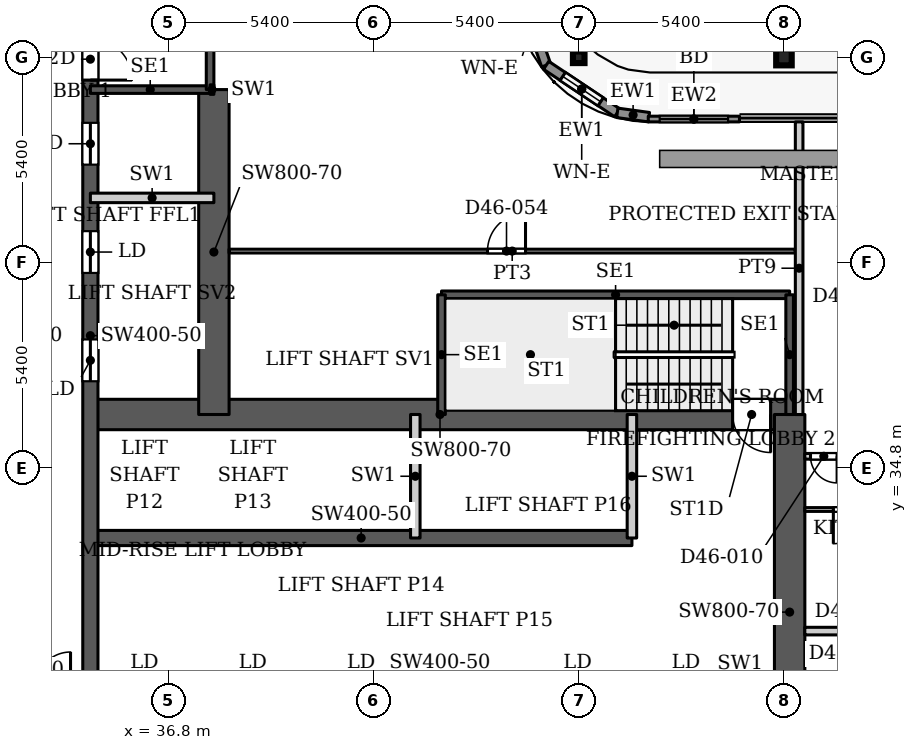
"""IFC4 building model, lengths in metres.
Left out: names, types, materials, properties, quantities, classifications, styles, units other than length and angle.
Written with IfcOpenShell. Run it as: python <this file> out.ifc"""

import sys

from ifc_helpers import new_model, si_unit, direction, frame, frame_2d, origin, origin_2d, place, context, subcontext, project, spatial, rectangle, hollow_rectangle, i_section, extrude, source, transform, mapped, element, fill, save


model = new_model("IFC4")
c1 = context("Model", 3, precision=1e-05, world=origin(), true_north=direction((0.0, 1.0)))
c2 = subcontext(c1, "Body", "Model", "MODEL_VIEW")
j1 = project(units=[si_unit("LENGTHUNIT", "METRE"), si_unit("PLANEANGLEUNIT", "RADIAN")], contexts=[c1])
p1 = place(None, origin())
s1 = spatial("IfcSite", under=j1, at=p1, CompositionType="ELEMENT")
p2 = place(p1, origin())
s2 = spatial("IfcBuilding", under=s1, at=p2, CompositionType="ELEMENT")
p3 = place(p2, frame((0.0, 0.0, 199.4)))
s3 = spatial("IfcBuildingStorey", under=s2, at=p3, CompositionType="ELEMENT", Elevation=199.4)
p4 = place(p3, frame((53.0, 45.6, 0.0), z_axis=(0.0, 0.0, 1.0), x_axis=(1.0, 0.0, 0.0)))
e1 = element("IfcColumn", 1, at=p4, inside=s3, PredefinedType="COLUMN", context=c2, shape_type="SweptSolid", body=[
    extrude(i_section(OverallWidth=0.409, OverallDepth=0.425, WebThickness=0.033, FlangeThickness=0.052, FilletRadius=0.013, at=origin_2d()), origin(), (0.0, 0.0, 1.0), 3.9),
])
p5 = place(p3, frame((47.6, 45.6, 0.0), z_axis=(0.0, 0.0, 1.0), x_axis=(1.0, 0.0, 0.0)))
e2 = element("IfcColumn", 2, at=p5, inside=s3, PredefinedType="COLUMN", context=c2, shape_type="SweptSolid", body=[
    extrude(hollow_rectangle(XDim=0.305, YDim=0.305, WallThickness=0.016, InnerFilletRadius=0.016, OuterFilletRadius=0.032, at=origin_2d()), origin(), (0.0, 0.0, 1.0), 3.9),
])
p6 = place(p3, frame((34.75, 32.95, 0.0), z_axis=(0.0, 0.0, 1.0), x_axis=(1.0, 0.0, 0.0)))
e3 = element("IfcWall", 3, at=p6, inside=s3, PredefinedType="SHEAR", context=c2, shape_type="SweptSolid", body=[
    extrude(rectangle(XDim=14.25, YDim=0.4, at=frame_2d((7.125, 0.0))), origin(), (0.0, 0.0, 1.0), 3.9),
])
p7 = place(p3, frame((34.75, 36.2, 0.0), z_axis=(0.0, 0.0, 1.0), x_axis=(1.0, 0.0, 0.0)))
e4 = element("IfcWall", 4, at=p7, inside=s3, PredefinedType="SHEAR", context=c2, shape_type="SweptSolid", body=[
    extrude(rectangle(XDim=18.4, YDim=0.8, at=frame_2d((9.2, 0.0))), origin(), (0.0, 0.0, 1.0), 3.9),
])
p8 = place(p7, frame((16.9, 0.0, 0.0)))
e5 = element("IfcOpeningElement", 5, at=p8, cuts=e4, PredefinedType="OPENING", context=c2, shape_type="SweptSolid", body=[
    extrude(rectangle(XDim=1.0, YDim=2.2, at=frame_2d((0.5, 1.1))), frame((0.0, 0.41, 0.0), z_axis=(0.0, -1.0, 0.0), x_axis=(1.0, 0.0, 0.0)), (0.0, 0.0, 1.0), 0.82),
])
p9 = place(p3, frame((34.75, 29.05, 0.0), z_axis=(0.0, 0.0, 1.0), x_axis=(0.0, 1.0, 0.0)))
e6 = element("IfcWall", 6, at=p9, inside=s3, PredefinedType="SHEAR", context=c2, shape_type="SweptSolid", body=[
    extrude(rectangle(XDim=18.45, YDim=0.4, at=frame_2d((9.225, 0.0))), origin(), (0.0, 0.0, 1.0), 3.9),
])
p10 = place(p9, frame((8.025, 0.0, 0.0)))
e7 = element("IfcOpeningElement", 7, at=p10, cuts=e6, PredefinedType="OPENING", context=c2, shape_type="SweptSolid", body=[
    extrude(rectangle(XDim=1.1, YDim=2.2, at=frame_2d((0.55, 1.1))), frame((0.0, 0.21, 0.0), z_axis=(0.0, -1.0, 0.0), x_axis=(1.0, 0.0, 0.0)), (0.0, 0.0, 1.0), 0.42),
])
p11 = place(p9, frame((10.875, 0.0, 0.0)))
e8 = element("IfcOpeningElement", 8, at=p11, cuts=e6, PredefinedType="OPENING", context=c2, shape_type="SweptSolid", body=[
    extrude(rectangle(XDim=1.1, YDim=2.2, at=frame_2d((0.55, 1.1))), frame((0.0, 0.21, 0.0), z_axis=(0.0, -1.0, 0.0), x_axis=(1.0, 0.0, 0.0)), (0.0, 0.0, 1.0), 0.42),
])
p12 = place(p9, frame((13.725, 0.0, 0.0)))
e9 = element("IfcOpeningElement", 9, at=p12, cuts=e6, PredefinedType="OPENING", context=c2, shape_type="SweptSolid", body=[
    extrude(rectangle(XDim=1.1, YDim=2.2, at=frame_2d((0.55, 1.1))), frame((0.0, 0.21, 0.0), z_axis=(0.0, -1.0, 0.0), x_axis=(1.0, 0.0, 0.0)), (0.0, 0.0, 1.0), 0.42),
])
p13 = place(p9, frame((15.95, 0.0, 0.0)))
e10 = element("IfcOpeningElement", 10, at=p13, cuts=e6, PredefinedType="OPENING", context=c2, shape_type="SweptSolid", body=[
    extrude(rectangle(XDim=1.1, YDim=2.2, at=frame_2d((0.55, 1.1))), frame((0.0, 0.21, 0.0), z_axis=(0.0, -1.0, 0.0), x_axis=(1.0, 0.0, 0.0)), (0.0, 0.0, 1.0), 0.42),
])
p14 = place(p3, frame((38.0, 36.2, 0.0), z_axis=(0.0, 0.0, 1.0), x_axis=(0.0, 1.0, 0.0)))
e11 = element("IfcWall", 11, at=p14, inside=s3, PredefinedType="SHEAR", context=c2, shape_type="SweptSolid", body=[
    extrude(rectangle(XDim=8.55, YDim=0.8, at=frame_2d((4.275, 0.0))), origin(), (0.0, 0.0, 1.0), 3.9),
])
p15 = place(p3, frame((53.15, 25.8, 0.0), z_axis=(0.0, 0.0, 1.0), x_axis=(0.0, 1.0, 0.0)))
e12 = element("IfcWall", 12, at=p15, inside=s3, PredefinedType="SHEAR", context=c2, shape_type="SweptSolid", body=[
    extrude(rectangle(XDim=10.4, YDim=0.8, at=frame_2d((5.2, 0.0))), origin(), (0.0, 0.0, 1.0), 3.9),
])
p16 = place(p3, frame((46.018, 47.471, 0.0), z_axis=(0.0, 0.0, 1.0), x_axis=(0.328791208903, -0.944402637093, 0.0)))
e13 = element("IfcWall", 13, at=p16, inside=s3, PredefinedType="SOLIDWALL", context=c2, shape_type="SweptSolid", body=[
    extrude(rectangle(XDim=2.205, YDim=0.25, at=frame_2d((1.102, 0.0))), origin(), (0.0, 0.0, 1.0), 3.75),
])
p17 = place(p16, frame((0.503, 0.0, 0.6)))
e14 = element("IfcOpeningElement", 14, at=p17, cuts=e13, PredefinedType="OPENING", context=c2, shape_type="SweptSolid", body=[
    extrude(rectangle(XDim=1.2, YDim=2.1, at=frame_2d((0.6, 1.05))), frame((0.0, 0.135, 0.0), z_axis=(0.0, -1.0, 0.0), x_axis=(1.0, 0.0, 0.0)), (0.0, 0.0, 1.0), 0.27),
])
p18 = place(p3, frame((46.743, 45.389, 0.0), z_axis=(0.0, 0.0, 1.0), x_axis=(0.831449265529, -0.555600682912, 0.0)))
e15 = element("IfcWall", 15, at=p18, inside=s3, PredefinedType="SOLIDWALL", context=c2, shape_type="SweptSolid", body=[
    extrude(rectangle(XDim=2.251, YDim=0.25, at=frame_2d((1.126, 0.0))), origin(), (0.0, 0.0, 1.0), 3.75),
])
p19 = place(p18, frame((0.525, 0.0, 0.6)))
e16 = element("IfcOpeningElement", 16, at=p19, cuts=e15, PredefinedType="OPENING", context=c2, shape_type="SweptSolid", body=[
    extrude(rectangle(XDim=1.2, YDim=2.1, at=frame_2d((0.6, 1.05))), frame((0.0, 0.135, 0.0), z_axis=(0.0, -1.0, 0.0), x_axis=(1.0, 0.0, 0.0)), (0.0, 0.0, 1.0), 0.27),
])
p20 = place(p3, frame((48.615, 44.138, 0.0), z_axis=(0.0, 0.0, 1.0), x_axis=(0.990741504246, -0.135761819977, 0.0)))
e17 = element("IfcWall", 17, at=p20, inside=s3, PredefinedType="SOLIDWALL", context=c2, shape_type="SweptSolid", body=[
    extrude(rectangle(XDim=0.84, YDim=0.25, at=frame_2d((0.42, 0.0))), origin(), (0.0, 0.0, 1.0), 3.75),
])
p21 = place(p3, frame((49.43, 43.975, 0.0), z_axis=(0.0, 0.0, 1.0), x_axis=(1.0, 0.0, 0.0)))
e18 = element("IfcWall", 18, at=p21, inside=s3, PredefinedType="SOLIDWALL", context=c2, shape_type="SweptSolid", body=[
    extrude(rectangle(XDim=2.4, YDim=0.15, at=frame_2d((1.2, 0.0))), origin(), (0.0, 0.0, 1.0), 3.75),
])
p22 = place(p21, frame((0.3, 0.0, 0.0)))
e19 = element("IfcOpeningElement", 19, at=p22, cuts=e18, PredefinedType="OPENING", context=c2, shape_type="SweptSolid", body=[
    extrude(rectangle(XDim=1.8, YDim=2.4, at=frame_2d((0.9, 1.2))), frame((0.0, 0.085, 0.0), z_axis=(0.0, -1.0, 0.0), x_axis=(1.0, 0.0, 0.0)), (0.0, 0.0, 1.0), 0.17),
])
p23 = place(p3, frame((43.99, 39.35, 0.0), z_axis=(0.0, 0.0, 1.0), x_axis=(1.0, 0.0, 0.0)))
e20 = element("IfcWall", 20, at=p23, inside=s3, PredefinedType="SHEAR", context=c2, shape_type="SweptSolid", body=[
    extrude(rectangle(XDim=9.16, YDim=0.2, at=frame_2d((4.58, 0.0))), origin(), (0.0, 0.0, 1.0), 3.9),
])
for number, where, z_axis, x_axis in (
    (21, (43.99, 36.2, 0.0), (0.0, 0.0, 1.0), (0.0, 1.0, 0.0)),
    (22, (53.15, 36.2, 0.0), (0.0, 0.0, 1.0), (0.0, 1.0, 0.0)),
):
    element("IfcWall", number, at=place(p3, frame(where, z_axis=z_axis, x_axis=x_axis)), inside=s3, PredefinedType="SHEAR", context=c2, shape_type="SweptSolid", body=[
        extrude(rectangle(XDim=3.15, YDim=0.2, at=frame_2d((1.575, 0.0))), origin(), (0.0, 0.0, 1.0), 3.9),
    ])
p24 = place(p3, frame((34.75, 44.75, 0.0), z_axis=(0.0, 0.0, 1.0), x_axis=(1.0, 0.0, 0.0)))
e23 = element("IfcWall", 23, at=p24, inside=s3, PredefinedType="SHEAR", context=c2, shape_type="SweptSolid", body=[
    extrude(rectangle(XDim=3.15, YDim=0.2, at=frame_2d((1.575, 0.0))), origin(), (0.0, 0.0, 1.0), 3.9),
])
p25 = place(p3, frame((37.9, 44.75, 0.0), z_axis=(0.0, 0.0, 1.0), x_axis=(0.0, 1.0, 0.0)))
e24 = element("IfcWall", 24, at=p25, inside=s3, PredefinedType="SHEAR", context=c2, shape_type="SweptSolid", body=[
    extrude(rectangle(XDim=9.16, YDim=0.2, at=frame_2d((4.58, 0.0))), origin(), (0.0, 0.0, 1.0), 3.9),
])
for number, where, z_axis, x_axis in (
    (25, (43.3, 32.95, 0.0), (0.0, 0.0, 1.0), (0.0, 1.0, 0.0)),
    (26, (49.0, 32.95, 0.0), (0.0, 0.0, 1.0), (0.0, 1.0, 0.0)),
    (27, (34.75, 41.9, 0.0), (0.0, 0.0, 1.0), (1.0, 0.0, 0.0)),
):
    element("IfcWall", number, at=place(p3, frame(where, z_axis=z_axis, x_axis=x_axis)), inside=s3, PredefinedType="PARTITIONING", context=c2, shape_type="SweptSolid", body=[
        extrude(rectangle(XDim=3.25, YDim=0.25, at=frame_2d((1.625, 0.0))), origin(), (0.0, 0.0, 1.0), 3.9),
    ])
p26 = place(p3, frame((37.9, 44.75, 0.0), z_axis=(0.0, 0.0, 1.0), x_axis=(1.0, 0.0, 0.0)))
e28 = element("IfcWall", 28, at=p26, inside=s3, PredefinedType="PARTITIONING", context=c2, shape_type="SweptSolid", body=[
    extrude(rectangle(XDim=0.1, YDim=0.25, at=frame_2d((0.05, 0.0))), origin(), (0.0, 0.0, 1.0), 3.9),
])
p27 = place(p3, frame((38.399, 40.5, 0.0), z_axis=(0.0, 0.0, 1.0), x_axis=(1.0, 0.0, 0.0)))
e29 = element("IfcWall", 29, at=p27, inside=s3, PredefinedType="PARTITIONING", context=c2, shape_type="SweptSolid", body=[
    extrude(rectangle(XDim=14.901, YDim=0.1, at=frame_2d((7.451, 0.0))), origin(), (0.0, 0.0, 1.0), 3.6),
])
p28 = place(p27, frame((6.801, 0.0, 0.0)))
e30 = element("IfcOpeningElement", 30, at=p28, cuts=e29, PredefinedType="OPENING", context=c2, shape_type="SweptSolid", body=[
    extrude(rectangle(XDim=1.0, YDim=2.1, at=frame_2d((0.5, 1.05))), frame((0.0, 0.06, 0.0), z_axis=(0.0, -1.0, 0.0), x_axis=(1.0, 0.0, 0.0)), (0.0, 0.0, 1.0), 0.12),
])
p29 = place(p3, frame((53.4, 36.199, 0.0), z_axis=(0.0, 0.0, 1.0), x_axis=(0.0, 1.0, 0.0)))
e31 = element("IfcWall", 31, at=p29, inside=s3, PredefinedType="PARTITIONING", context=c2, shape_type="SweptSolid", body=[
    extrude(rectangle(XDim=7.701, YDim=0.2, at=frame_2d((3.851, 0.0))), origin(), (0.0, 0.0, 1.0), 3.6),
])
p30 = place(p3, frame((53.549, 30.5, 0.0), z_axis=(0.0, 0.0, 1.0), x_axis=(1.0, 0.0, 0.0)))
e32 = element("IfcWall", 32, at=p30, inside=s3, PredefinedType="PARTITIONING", context=c2, shape_type="SweptSolid", body=[
    extrude(rectangle(XDim=44.551, YDim=0.2, at=frame_2d((22.275, 0.0))), origin(), (0.0, 0.0, 1.0), 3.6),
])
p31 = place(p30, frame((5.501, 0.0, 0.0)))
e33 = element("IfcOpeningElement", 33, at=p31, cuts=e32, PredefinedType="OPENING", context=c2, shape_type="SweptSolid", body=[
    extrude(rectangle(XDim=1.0, YDim=2.1, at=frame_2d((0.5, 1.05))), frame((0.0, 0.11, 0.0), z_axis=(0.0, -1.0, 0.0), x_axis=(1.0, 0.0, 0.0)), (0.0, 0.0, 1.0), 0.22),
])
p32 = place(p30, frame((20.201, 0.0, 0.0)))
e34 = element("IfcOpeningElement", 34, at=p32, cuts=e32, PredefinedType="OPENING", context=c2, shape_type="SweptSolid", body=[
    extrude(rectangle(XDim=1.0, YDim=2.1, at=frame_2d((0.5, 1.05))), frame((0.0, 0.11, 0.0), z_axis=(0.0, -1.0, 0.0), x_axis=(1.0, 0.0, 0.0)), (0.0, 0.0, 1.0), 0.22),
])
p33 = place(p30, frame((24.251, 0.0, 0.0)))
e35 = element("IfcOpeningElement", 35, at=p33, cuts=e32, PredefinedType="OPENING", context=c2, shape_type="SweptSolid", body=[
    extrude(rectangle(XDim=1.0, YDim=2.1, at=frame_2d((0.5, 1.05))), frame((0.0, 0.11, 0.0), z_axis=(0.0, -1.0, 0.0), x_axis=(1.0, 0.0, 0.0)), (0.0, 0.0, 1.0), 0.22),
])
p34 = place(p30, frame((40.151, 0.0, 0.0)))
e36 = element("IfcOpeningElement", 36, at=p34, cuts=e32, PredefinedType="OPENING", context=c2, shape_type="SweptSolid", body=[
    extrude(rectangle(XDim=1.0, YDim=2.1, at=frame_2d((0.5, 1.05))), frame((0.0, 0.11, 0.0), z_axis=(0.0, -1.0, 0.0), x_axis=(1.0, 0.0, 0.0)), (0.0, 0.0, 1.0), 0.22),
])
p35 = place(p3, frame((53.549, 33.7, 0.0), z_axis=(0.0, 0.0, 1.0), x_axis=(1.0, 0.0, 0.0)))
e37 = element("IfcWall", 37, at=p35, inside=s3, PredefinedType="PARTITIONING", context=c2, shape_type="SweptSolid", body=[
    extrude(rectangle(XDim=5.001, YDim=0.1, at=frame_2d((2.5, 0.0))), origin(), (0.0, 0.0, 1.0), 3.6),
])
p36 = place(p35, frame((0.751, 0.0, 0.0)))
e38 = element("IfcOpeningElement", 38, at=p36, cuts=e37, PredefinedType="OPENING", context=c2, shape_type="SweptSolid", body=[
    extrude(rectangle(XDim=0.9, YDim=2.1, at=frame_2d((0.45, 1.05))), frame((0.0, 0.06, 0.0), z_axis=(0.0, -1.0, 0.0), x_axis=(1.0, 0.0, 0.0)), (0.0, 0.0, 1.0), 0.12),
])
p37 = place(p35, frame((3.651, 0.0, 0.0)))
e39 = element("IfcOpeningElement", 39, at=p37, cuts=e37, PredefinedType="OPENING", context=c2, shape_type="SweptSolid", body=[
    extrude(rectangle(XDim=0.8, YDim=2.1, at=frame_2d((0.4, 1.05))), frame((0.0, 0.06, 0.0), z_axis=(0.0, -1.0, 0.0), x_axis=(1.0, 0.0, 0.0)), (0.0, 0.0, 1.0), 0.12),
])
p38 = place(p3, frame((53.549, 35.1, 0.0), z_axis=(0.0, 0.0, 1.0), x_axis=(1.0, 0.0, 0.0)))
e40 = element("IfcWall", 40, at=p38, inside=s3, PredefinedType="PARTITIONING", context=c2, shape_type="SweptSolid", body=[
    extrude(rectangle(XDim=13.551, YDim=0.15, at=frame_2d((6.775, 0.0))), origin(), (0.0, 0.0, 1.0), 3.6),
])
p39 = place(p38, frame((3.901, 0.0, 0.0)))
e41 = element("IfcOpeningElement", 41, at=p39, cuts=e40, PredefinedType="OPENING", context=c2, shape_type="SweptSolid", body=[
    extrude(rectangle(XDim=0.9, YDim=2.1, at=frame_2d((0.45, 1.05))), frame((0.0, 0.085, 0.0), z_axis=(0.0, -1.0, 0.0), x_axis=(1.0, 0.0, 0.0)), (0.0, 0.0, 1.0), 0.17),
])
p40 = place(p38, frame((8.701, 0.0, 0.0)))
e42 = element("IfcOpeningElement", 42, at=p40, cuts=e40, PredefinedType="OPENING", context=c2, shape_type="SweptSolid", body=[
    extrude(rectangle(XDim=0.9, YDim=2.1, at=frame_2d((0.45, 1.05))), frame((0.0, 0.085, 0.0), z_axis=(0.0, -1.0, 0.0), x_axis=(1.0, 0.0, 0.0)), (0.0, 0.0, 1.0), 0.17),
])
p41 = place(p38, frame((11.501, 0.0, 0.0)))
e43 = element("IfcOpeningElement", 43, at=p41, cuts=e40, PredefinedType="OPENING", context=c2, shape_type="SweptSolid", body=[
    extrude(rectangle(XDim=1.0, YDim=2.1, at=frame_2d((0.5, 1.05))), frame((0.0, 0.085, 0.0), z_axis=(0.0, -1.0, 0.0), x_axis=(1.0, 0.0, 0.0)), (0.0, 0.0, 1.0), 0.17),
])
p42 = place(p38, frame((6.301, 0.0, 0.0)))
e44 = element("IfcOpeningElement", 44, at=p42, cuts=e40, PredefinedType="OPENING", context=c2, shape_type="SweptSolid", body=[
    extrude(rectangle(XDim=0.9, YDim=2.1, at=frame_2d((0.45, 1.05))), frame((0.0, 0.085, 0.0), z_axis=(0.0, -1.0, 0.0), x_axis=(1.0, 0.0, 0.0)), (0.0, 0.0, 1.0), 0.17),
])
p43 = place(p38, frame((0.15, 0.0, 0.0)))
e45 = element("IfcOpeningElement", 45, at=p43, cuts=e40, PredefinedType="OPENING", context=c2, shape_type="SweptSolid", body=[
    extrude(rectangle(XDim=0.7, YDim=2.1, at=frame_2d((0.35, 1.05))), frame((0.0, 0.085, 0.0), z_axis=(0.0, -1.0, 0.0), x_axis=(1.0, 0.0, 0.0)), (0.0, 0.0, 1.0), 0.17),
])
m1 = source(origin(), c2, "Body", "SweptSolid", [
    extrude(rectangle(XDim=1.2, YDim=2.1, at=frame_2d((0.6, 1.05))), frame((0.0, 0.03, 0.0), z_axis=(0.0, -1.0, 0.0), x_axis=(1.0, 0.0, 0.0)), (0.0, 0.0, 1.0), 0.06),
])
p44 = place(p19, origin())
e46 = element("IfcWindow", 46, at=p44, inside=s3, PartitioningType="SINGLE_PANEL", PredefinedType="WINDOW", context=c2, shape_type="MappedRepresentation", body=[
    mapped(m1, transform((0.0, 0.0, 0.0), x_axis=(1.0, 0.0, 0.0), y_axis=(0.0, 1.0, 0.0), z_axis=(0.0, 0.0, 1.0), scale=1.0)),
])
fill(e16, e46)
m2 = source(origin(), c2, "Body", "SweptSolid", [
    extrude(rectangle(XDim=1.8, YDim=2.4, at=frame_2d((0.9, 1.2))), frame((0.0, 0.025, 0.0), z_axis=(0.0, -1.0, 0.0), x_axis=(1.0, 0.0, 0.0)), (0.0, 0.0, 1.0), 0.05),
])
p45 = place(p22, origin())
e47 = element("IfcDoor", 47, at=p45, inside=s3, OperationType="SLIDING_TO_LEFT", PredefinedType="DOOR", context=c2, shape_type="MappedRepresentation", body=[
    mapped(m2, transform((0.0, 0.0, 0.0), x_axis=(1.0, 0.0, 0.0), y_axis=(0.0, 1.0, 0.0), z_axis=(0.0, 0.0, 1.0), scale=1.0)),
])
fill(e19, e47)
m3 = source(origin(), c2, "Body", "SweptSolid", [
    extrude(rectangle(XDim=1.1, YDim=2.2, at=frame_2d((0.55, 1.1))), frame((0.0, 0.025, 0.0), z_axis=(0.0, -1.0, 0.0), x_axis=(1.0, 0.0, 0.0)), (0.0, 0.0, 1.0), 0.05),
])
p46 = place(p10, origin())
e48 = element("IfcDoor", 48, at=p46, inside=s3, OperationType="SLIDING_TO_LEFT", PredefinedType="DOOR", context=c2, shape_type="MappedRepresentation", body=[
    mapped(m3, transform((0.0, 0.0, 0.0), x_axis=(1.0, 0.0, 0.0), y_axis=(0.0, 1.0, 0.0), z_axis=(0.0, 0.0, 1.0), scale=1.0)),
])
fill(e7, e48)
p47 = place(p11, origin())
e49 = element("IfcDoor", 49, at=p47, inside=s3, OperationType="SLIDING_TO_LEFT", PredefinedType="DOOR", context=c2, shape_type="MappedRepresentation", body=[
    mapped(m3, transform((0.0, 0.0, 0.0), x_axis=(1.0, 0.0, 0.0), y_axis=(0.0, 1.0, 0.0), z_axis=(0.0, 0.0, 1.0), scale=1.0)),
])
fill(e8, e49)
p48 = place(p12, origin())
e50 = element("IfcDoor", 50, at=p48, inside=s3, OperationType="SLIDING_TO_LEFT", PredefinedType="DOOR", context=c2, shape_type="MappedRepresentation", body=[
    mapped(m3, transform((0.0, 0.0, 0.0), x_axis=(1.0, 0.0, 0.0), y_axis=(0.0, 1.0, 0.0), z_axis=(0.0, 0.0, 1.0), scale=1.0)),
])
fill(e9, e50)
m4 = source(origin(), c2, "Body", "SweptSolid", [
    extrude(rectangle(XDim=1.0, YDim=2.2, at=frame_2d((0.5, 1.1))), frame((0.0, 0.025, 0.0), z_axis=(0.0, -1.0, 0.0), x_axis=(1.0, 0.0, 0.0)), (0.0, 0.0, 1.0), 0.05),
])
p49 = place(p8, origin())
e51 = element("IfcDoor", 51, at=p49, inside=s3, OperationType="SINGLE_SWING_RIGHT", PredefinedType="DOOR", context=c2, shape_type="MappedRepresentation", body=[
    mapped(m4, transform((0.0, 0.0, 0.0), x_axis=(1.0, 0.0, 0.0), y_axis=(0.0, 1.0, 0.0), z_axis=(0.0, 0.0, 1.0), scale=1.0)),
])
fill(e5, e51)
m5 = source(origin(), c2, "Body", "SweptSolid", [
    extrude(rectangle(XDim=1.1, YDim=2.2, at=frame_2d((0.55, 1.1))), frame((0.0, 0.025, 0.0), z_axis=(0.0, -1.0, 0.0), x_axis=(1.0, 0.0, 0.0)), (0.0, 0.0, 1.0), 0.05),
])
p50 = place(p13, origin())
e52 = element("IfcDoor", 52, at=p50, inside=s3, OperationType="SINGLE_SWING_RIGHT", PredefinedType="DOOR", context=c2, shape_type="MappedRepresentation", body=[
    mapped(m5, transform((0.0, 0.0, 0.0), x_axis=(1.0, 0.0, 0.0), y_axis=(0.0, 1.0, 0.0), z_axis=(0.0, 0.0, 1.0), scale=1.0)),
])
fill(e10, e52)
m6 = source(origin(), c2, "Body", "SweptSolid", [
    extrude(rectangle(XDim=0.9, YDim=2.1, at=frame_2d((0.45, 1.05))), frame((0.0, 0.025, 0.0), z_axis=(0.0, -1.0, 0.0), x_axis=(1.0, 0.0, 0.0)), (0.0, 0.0, 1.0), 0.05),
])
p51 = place(p36, origin())
e53 = element("IfcDoor", 53, at=p51, inside=s3, OperationType="SINGLE_SWING_RIGHT", PredefinedType="DOOR", context=c2, shape_type="MappedRepresentation", body=[
    mapped(m6, transform((0.0, 0.0, 0.0), x_axis=(1.0, 0.0, 0.0), y_axis=(0.0, 1.0, 0.0), z_axis=(0.0, 0.0, 1.0), scale=1.0)),
])
fill(e38, e53)
m7 = source(origin(), c2, "Body", "SweptSolid", [
    extrude(rectangle(XDim=0.7, YDim=2.1, at=frame_2d((0.35, 1.05))), frame((0.0, 0.025, 0.0), z_axis=(0.0, -1.0, 0.0), x_axis=(1.0, 0.0, 0.0)), (0.0, 0.0, 1.0), 0.05),
])
p52 = place(p43, origin())
e54 = element("IfcDoor", 54, at=p52, inside=s3, OperationType="SINGLE_SWING_RIGHT", PredefinedType="DOOR", context=c2, shape_type="MappedRepresentation", body=[
    mapped(m7, transform((0.0, 0.0, 0.0), x_axis=(1.0, 0.0, 0.0), y_axis=(0.0, 1.0, 0.0), z_axis=(0.0, 0.0, 1.0), scale=1.0)),
])
fill(e45, e54)
m8 = source(origin(), c2, "Body", "SweptSolid", [
    extrude(rectangle(XDim=1.0, YDim=2.1, at=frame_2d((0.5, 1.05))), frame((0.0, 0.025, 0.0), z_axis=(0.0, -1.0, 0.0), x_axis=(1.0, 0.0, 0.0)), (0.0, 0.0, 1.0), 0.05),
])
p53 = place(p28, origin())
e55 = element("IfcDoor", 55, at=p53, inside=s3, OperationType="SINGLE_SWING_LEFT", PredefinedType="DOOR", context=c2, shape_type="MappedRepresentation", body=[
    mapped(m8, transform((0.0, 0.0, 0.0), x_axis=(1.0, 0.0, 0.0), y_axis=(0.0, 1.0, 0.0), z_axis=(0.0, 0.0, 1.0), scale=1.0)),
])
fill(e30, e55)
save(model, sys.argv[1])
